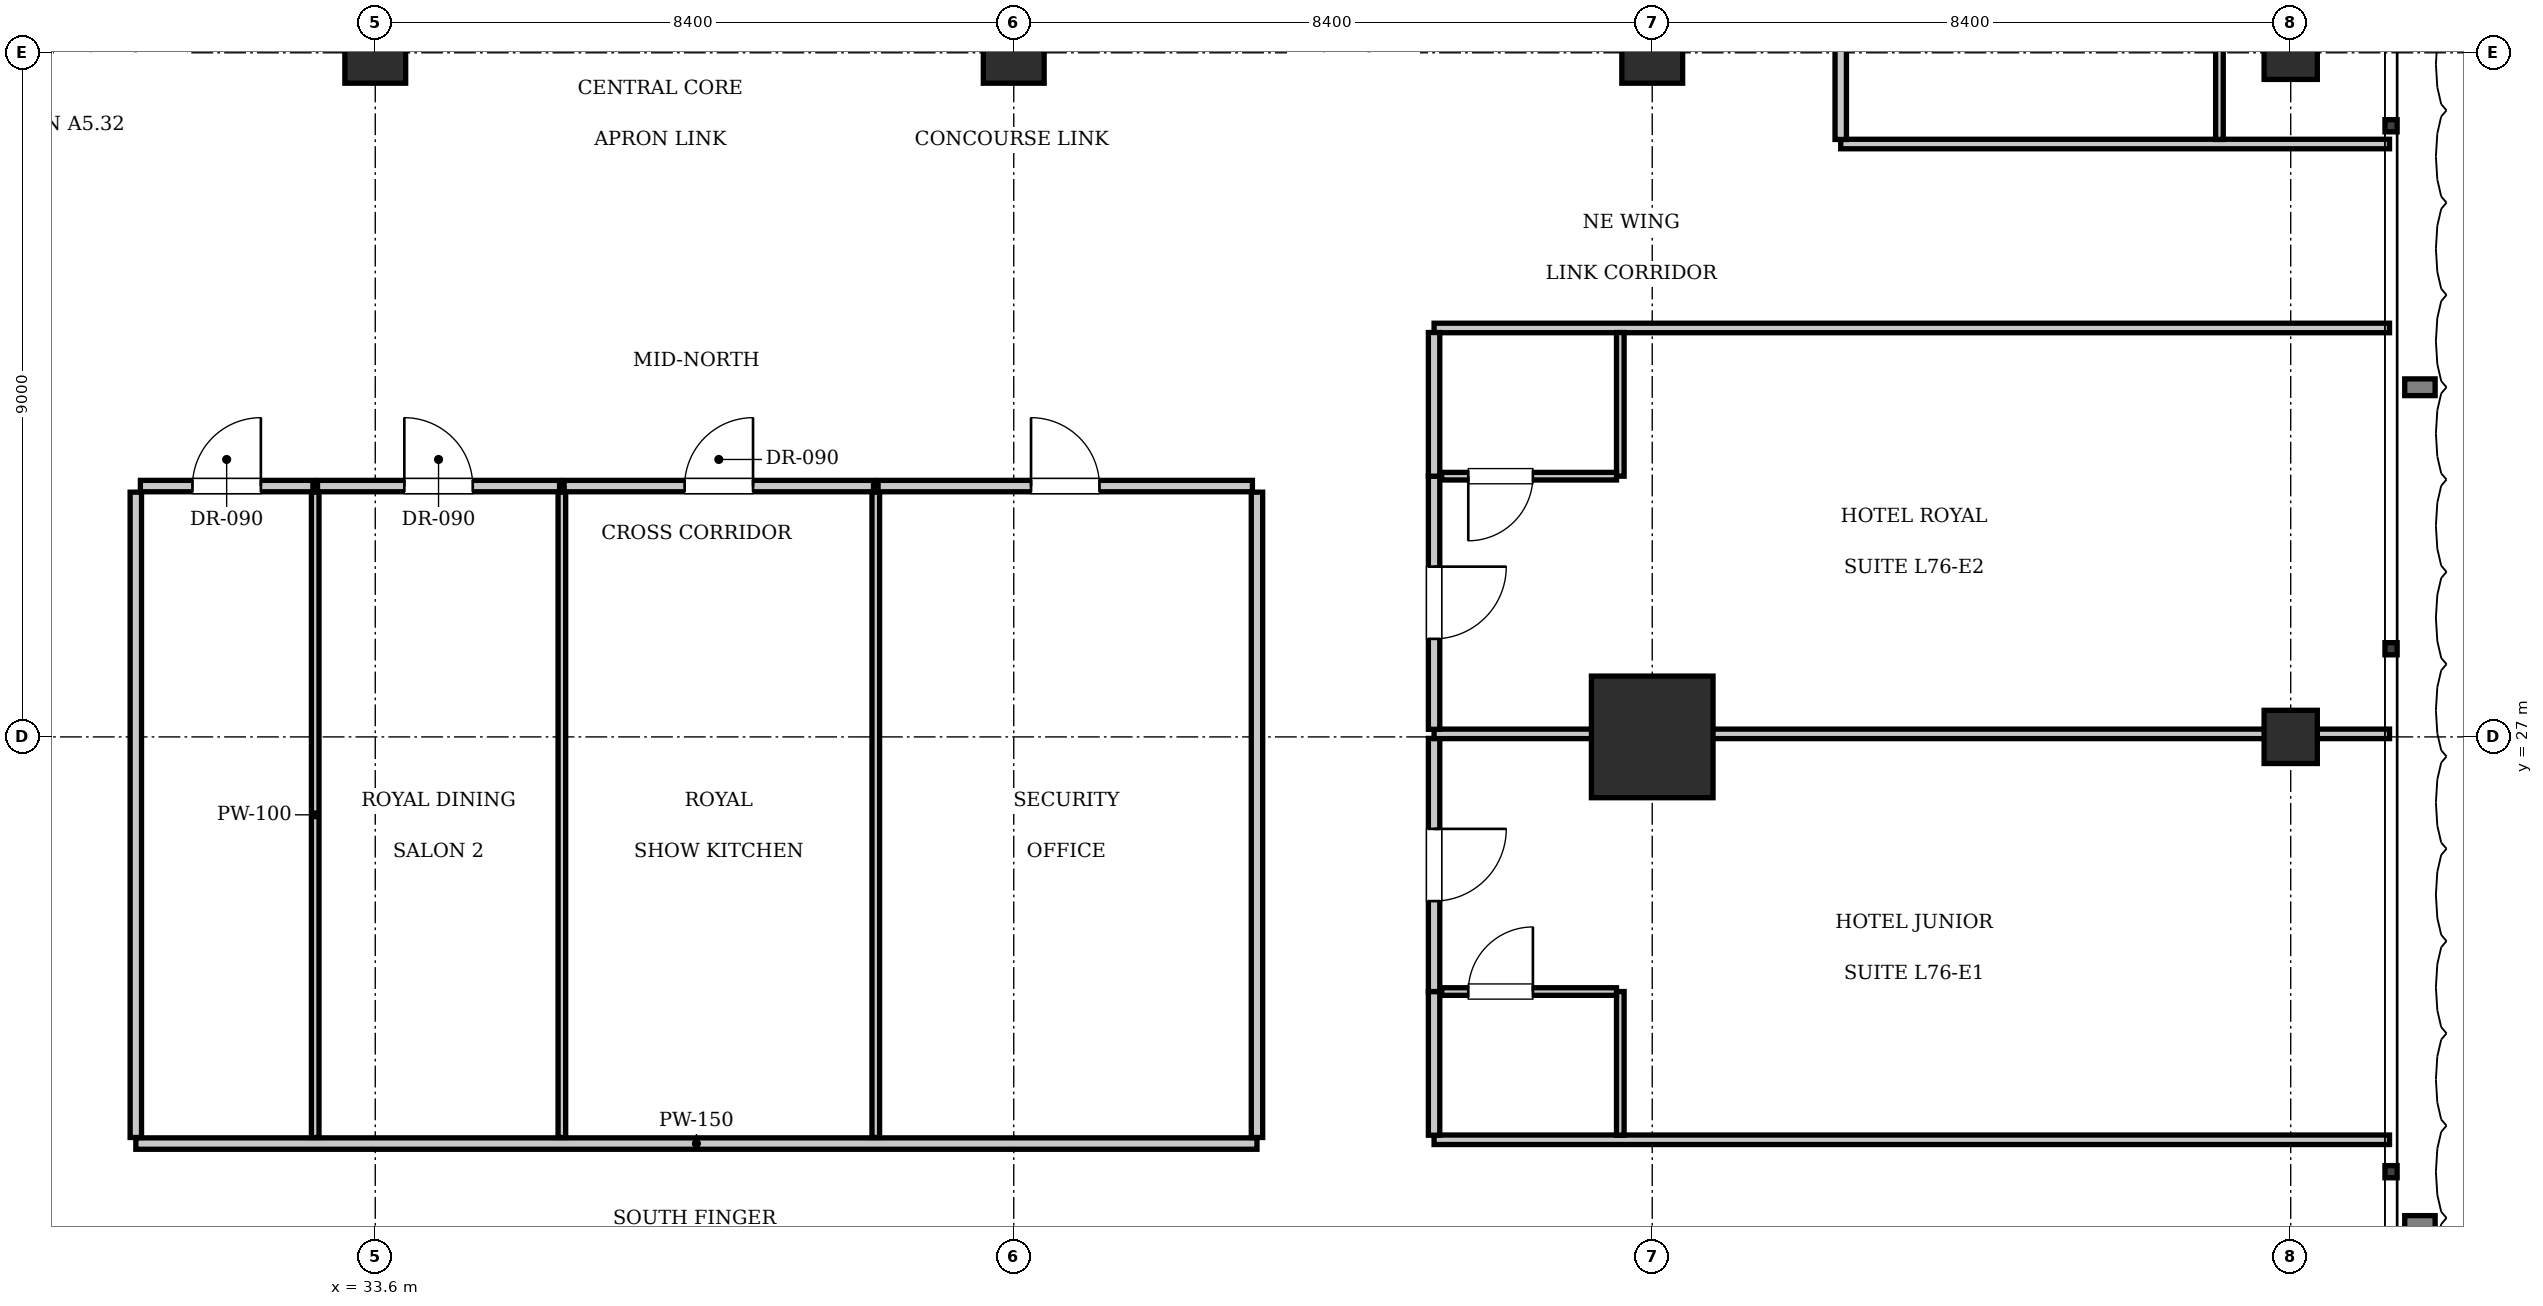
"""IFC4 building model, lengths in metres.
Left out: names, types, materials, properties, quantities, classifications, styles, units other than length and angle.
Written with IfcOpenShell. Run it as: python <this file> out.ifc"""

import sys

from ifc_helpers import new_model, si_unit, direction, frame, frame_2d, origin, origin_2d, place, context, subcontext, project, spatial, rectangle, extrude, element, fill, save


model = new_model("IFC4")
c1 = context("Model", 3, precision=1e-05, world=origin(), true_north=direction((0.0, 1.0)))
c2 = subcontext(c1, "Body", "Model", "MODEL_VIEW")
j1 = project(units=[si_unit("LENGTHUNIT", "METRE"), si_unit("PLANEANGLEUNIT", "RADIAN")], contexts=[c1])
p1 = place(None, origin())
s1 = spatial("IfcSite", under=j1, at=p1, CompositionType="ELEMENT")
p2 = place(p1, origin())
s2 = spatial("IfcBuilding", under=s1, at=p2, CompositionType="ELEMENT")
p3 = place(p2, frame((0.0, 0.0, 308.7)))
s3 = spatial("IfcBuildingStorey", under=s2, at=p3, CompositionType="ELEMENT", Elevation=308.7)
p4 = place(p3, frame((50.4, 27.0, 0.0), z_axis=(0.0, 0.0, 1.0), x_axis=(1.0, 0.0, 0.0)))
e1 = element("IfcColumn", 1, at=p4, inside=s3, PredefinedType="COLUMN", context=c2, shape_type="SweptSolid", body=[
    extrude(rectangle(XDim=1.6, YDim=1.6, at=origin_2d()), origin(), (0.0, 0.0, 1.0), 3.85),
])
for number, where, z_axis, x_axis in (
    (2, (33.6, 36.0, 0.0), (0.0, 0.0, 1.0), (1.0, 0.0, 0.0)),
    (3, (42.0, 36.0, 0.0), (0.0, 0.0, 1.0), (1.0, 0.0, 0.0)),
    (4, (50.4, 36.0, 0.0), (0.0, 0.0, 1.0), (1.0, 0.0, 0.0)),
):
    element("IfcColumn", number, at=place(p3, frame(where, z_axis=z_axis, x_axis=x_axis)), inside=s3, PredefinedType="COLUMN", context=c2, shape_type="SweptSolid", body=[
        extrude(rectangle(XDim=0.8, YDim=0.8, at=origin_2d()), origin(), (0.0, 0.0, 1.0), 3.85),
    ])
for number, where, z_axis, x_axis in (
    (5, (58.8, 27.0, 0.0), (0.0, 0.0, 1.0), (1.0, 0.0, 0.0)),
    (6, (58.8, 36.0, 0.0), (0.0, 0.0, 1.0), (1.0, 0.0, 0.0)),
):
    element("IfcColumn", number, at=place(p3, frame(where, z_axis=z_axis, x_axis=x_axis)), inside=s3, PredefinedType="COLUMN", context=c2, shape_type="SweptSolid", body=[
        extrude(rectangle(XDim=0.7, YDim=0.7, at=origin_2d()), origin(), (0.0, 0.0, 1.0), 3.85),
    ])
p5 = place(p3, frame((30.45, 21.65, 0.0), z_axis=(0.0, 0.0, 1.0), x_axis=(1.0, 0.0, 0.0)))
e7 = element("IfcWall", 7, at=p5, inside=s3, PredefinedType="PARTITIONING", context=c2, shape_type="SweptSolid", body=[
    extrude(rectangle(XDim=14.75, YDim=0.15, at=frame_2d((7.375, 0.0))), origin(), (0.0, 0.0, 1.0), 3.61),
])
for number, where, z_axis, x_axis in (
    (8, (30.45, 21.73, 0.0), (0.0, 0.0, 1.0), (0.0, 1.0, 0.0)),
    (9, (45.2, 21.73, 0.0), (0.0, 0.0, 1.0), (0.0, 1.0, 0.0)),
):
    element("IfcWall", number, at=place(p3, frame(where, z_axis=z_axis, x_axis=x_axis)), inside=s3, PredefinedType="PARTITIONING", context=c2, shape_type="SweptSolid", body=[
        extrude(rectangle(XDim=8.49, YDim=0.15, at=frame_2d((4.245, 0.0))), origin(), (0.0, 0.0, 1.0), 3.61),
    ])
p6 = place(p3, frame((30.51, 30.3, 0.0), z_axis=(0.0, 0.0, 1.0), x_axis=(1.0, 0.0, 0.0)))
e10 = element("IfcWall", 10, at=p6, inside=s3, PredefinedType="PARTITIONING", context=c2, shape_type="SweptSolid", body=[
    extrude(rectangle(XDim=2.27, YDim=0.15, at=frame_2d((1.135, 0.0))), origin(), (0.0, 0.0, 1.0), 3.61),
])
p7 = place(p6, frame((0.685, 0.0, 0.0)))
e11 = element("IfcOpeningElement", 11, at=p7, cuts=e10, PredefinedType="OPENING", context=c2, shape_type="SweptSolid", body=[
    extrude(rectangle(XDim=0.9, YDim=2.1, at=frame_2d((0.45, 1.05))), frame((0.0, 0.085, 0.0), z_axis=(0.0, -1.0, 0.0), x_axis=(1.0, 0.0, 0.0)), (0.0, 0.0, 1.0), 0.17),
])
p8 = place(p3, frame((32.81, 21.73, 0.0), z_axis=(0.0, 0.0, 1.0), x_axis=(0.0, 1.0, 0.0)))
e12 = element("IfcWall", 12, at=p8, inside=s3, PredefinedType="PARTITIONING", context=c2, shape_type="SweptSolid", body=[
    extrude(rectangle(XDim=8.49, YDim=0.1, at=frame_2d((4.245, 0.0))), origin(), (0.0, 0.0, 1.0), 3.61),
])
p9 = place(p3, frame((32.84, 30.3, 0.0), z_axis=(0.0, 0.0, 1.0), x_axis=(1.0, 0.0, 0.0)))
e13 = element("IfcWall", 13, at=p9, inside=s3, PredefinedType="PARTITIONING", context=c2, shape_type="SweptSolid", body=[
    extrude(rectangle(XDim=3.185, YDim=0.15, at=frame_2d((1.592, 0.0))), origin(), (0.0, 0.0, 1.0), 3.61),
])
p10 = place(p9, frame((1.143, 0.0, 0.0)))
e14 = element("IfcOpeningElement", 14, at=p10, cuts=e13, PredefinedType="OPENING", context=c2, shape_type="SweptSolid", body=[
    extrude(rectangle(XDim=0.9, YDim=2.1, at=frame_2d((0.45, 1.05))), frame((0.0, 0.085, 0.0), z_axis=(0.0, -1.0, 0.0), x_axis=(1.0, 0.0, 0.0)), (0.0, 0.0, 1.0), 0.17),
])
p11 = place(p3, frame((36.055, 21.73, 0.0), z_axis=(0.0, 0.0, 1.0), x_axis=(0.0, 1.0, 0.0)))
e15 = element("IfcWall", 15, at=p11, inside=s3, PredefinedType="PARTITIONING", context=c2, shape_type="SweptSolid", body=[
    extrude(rectangle(XDim=8.49, YDim=0.1, at=frame_2d((4.245, 0.0))), origin(), (0.0, 0.0, 1.0), 3.61),
])
p12 = place(p3, frame((36.085, 30.3, 0.0), z_axis=(0.0, 0.0, 1.0), x_axis=(1.0, 0.0, 0.0)))
e16 = element("IfcWall", 16, at=p12, inside=s3, PredefinedType="PARTITIONING", context=c2, shape_type="SweptSolid", body=[
    extrude(rectangle(XDim=4.07, YDim=0.15, at=frame_2d((2.035, 0.0))), origin(), (0.0, 0.0, 1.0), 3.61),
])
p13 = place(p12, frame((1.585, 0.0, 0.0)))
e17 = element("IfcOpeningElement", 17, at=p13, cuts=e16, PredefinedType="OPENING", context=c2, shape_type="SweptSolid", body=[
    extrude(rectangle(XDim=0.9, YDim=2.1, at=frame_2d((0.45, 1.05))), frame((0.0, 0.085, 0.0), z_axis=(0.0, -1.0, 0.0), x_axis=(1.0, 0.0, 0.0)), (0.0, 0.0, 1.0), 0.17),
])
p14 = place(p3, frame((40.185, 21.73, 0.0), z_axis=(0.0, 0.0, 1.0), x_axis=(0.0, 1.0, 0.0)))
e18 = element("IfcWall", 18, at=p14, inside=s3, PredefinedType="PARTITIONING", context=c2, shape_type="SweptSolid", body=[
    extrude(rectangle(XDim=8.49, YDim=0.1, at=frame_2d((4.245, 0.0))), origin(), (0.0, 0.0, 1.0), 3.61),
])
p15 = place(p3, frame((40.215, 30.3, 0.0), z_axis=(0.0, 0.0, 1.0), x_axis=(1.0, 0.0, 0.0)))
e19 = element("IfcWall", 19, at=p15, inside=s3, PredefinedType="PARTITIONING", context=c2, shape_type="SweptSolid", body=[
    extrude(rectangle(XDim=4.925, YDim=0.15, at=frame_2d((2.462, 0.0))), origin(), (0.0, 0.0, 1.0), 3.61),
])
p16 = place(p15, frame((2.012, 0.0, 0.0)))
e20 = element("IfcOpeningElement", 20, at=p16, cuts=e19, PredefinedType="OPENING", context=c2, shape_type="SweptSolid", body=[
    extrude(rectangle(XDim=0.9, YDim=2.1, at=frame_2d((0.45, 1.05))), frame((0.0, 0.085, 0.0), z_axis=(0.0, -1.0, 0.0), x_axis=(1.0, 0.0, 0.0)), (0.0, 0.0, 1.0), 0.17),
])
for number, where, z_axis, x_axis in (
    (21, (47.53, 21.7, 0.0), (0.0, 0.0, 1.0), (1.0, 0.0, 0.0)),
    (22, (47.53, 32.38, 0.0), (0.0, 0.0, 1.0), (1.0, 0.0, 0.0)),
):
    element("IfcWall", number, at=place(p3, frame(where, z_axis=z_axis, x_axis=x_axis)), inside=s3, PredefinedType="PARTITIONING", context=c2, shape_type="SweptSolid", body=[
        extrude(rectangle(XDim=12.57, YDim=0.125, at=frame_2d((6.285, 0.0))), origin(), (0.0, 0.0, 1.0), 3.61),
    ])
p17 = place(p3, frame((47.53, 21.76, 0.0), z_axis=(0.0, 0.0, 1.0), x_axis=(0.0, 1.0, 0.0)))
e23 = element("IfcWall", 23, at=p17, inside=s3, PredefinedType="PARTITIONING", context=c2, shape_type="SweptSolid", body=[
    extrude(rectangle(XDim=1.89, YDim=0.15, at=frame_2d((0.945, 0.0))), origin(), (0.0, 0.0, 1.0), 3.61),
])
p18 = place(p3, frame((47.53, 23.65, 0.0), z_axis=(0.0, 0.0, 1.0), x_axis=(0.0, 1.0, 0.0)))
e24 = element("IfcWall", 24, at=p18, inside=s3, PredefinedType="PARTITIONING", context=c2, shape_type="SweptSolid", body=[
    extrude(rectangle(XDim=3.33, YDim=0.15, at=frame_2d((1.665, 0.0))), origin(), (0.0, 0.0, 1.0), 3.61),
])
p19 = place(p18, frame((1.19, 0.0, 0.0)))
e25 = element("IfcOpeningElement", 25, at=p19, cuts=e24, PredefinedType="OPENING", context=c2, shape_type="SweptSolid", body=[
    extrude(rectangle(XDim=0.95, YDim=2.15, at=frame_2d((0.475, 1.075))), frame((0.0, 0.085, 0.0), z_axis=(0.0, -1.0, 0.0), x_axis=(1.0, 0.0, 0.0)), (0.0, 0.0, 1.0), 0.17),
])
p20 = place(p3, frame((49.98, 21.76, 0.0), z_axis=(0.0, 0.0, 1.0), x_axis=(0.0, 1.0, 0.0)))
e26 = element("IfcWall", 26, at=p20, inside=s3, PredefinedType="PARTITIONING", context=c2, shape_type="SweptSolid", body=[
    extrude(rectangle(XDim=1.89, YDim=0.1, at=frame_2d((0.945, 0.0))), origin(), (0.0, 0.0, 1.0), 3.61),
])
p21 = place(p3, frame((47.63, 23.65, 0.0), z_axis=(0.0, 0.0, 1.0), x_axis=(1.0, 0.0, 0.0)))
e27 = element("IfcWall", 27, at=p21, inside=s3, PredefinedType="PARTITIONING", context=c2, shape_type="SweptSolid", body=[
    extrude(rectangle(XDim=2.3, YDim=0.1, at=frame_2d((1.15, 0.0))), origin(), (0.0, 0.0, 1.0), 3.61),
])
p22 = place(p21, frame((0.35, 0.0, 0.0)))
e28 = element("IfcOpeningElement", 28, at=p22, cuts=e27, PredefinedType="OPENING", context=c2, shape_type="SweptSolid", body=[
    extrude(rectangle(XDim=0.85, YDim=2.1, at=frame_2d((0.425, 1.05))), frame((0.0, 0.06, 0.0), z_axis=(0.0, -1.0, 0.0), x_axis=(1.0, 0.0, 0.0)), (0.0, 0.0, 1.0), 0.12),
])
p23 = place(p3, frame((47.53, 27.04, 0.0), z_axis=(0.0, 0.0, 1.0), x_axis=(1.0, 0.0, 0.0)))
e29 = element("IfcWall", 29, at=p23, inside=s3, PredefinedType="PARTITIONING", context=c2, shape_type="SweptSolid", body=[
    extrude(rectangle(XDim=12.57, YDim=0.125, at=frame_2d((6.285, 0.0))), origin(), (0.0, 0.0, 1.0), 2.41),
])
p24 = place(p3, frame((47.53, 27.1, 0.0), z_axis=(0.0, 0.0, 1.0), x_axis=(0.0, 1.0, 0.0)))
e30 = element("IfcWall", 30, at=p24, inside=s3, PredefinedType="PARTITIONING", context=c2, shape_type="SweptSolid", body=[
    extrude(rectangle(XDim=3.33, YDim=0.15, at=frame_2d((1.665, 0.0))), origin(), (0.0, 0.0, 1.0), 3.61),
])
p25 = place(p24, frame((1.19, 0.0, 0.0)))
e31 = element("IfcOpeningElement", 31, at=p25, cuts=e30, PredefinedType="OPENING", context=c2, shape_type="SweptSolid", body=[
    extrude(rectangle(XDim=0.95, YDim=2.15, at=frame_2d((0.475, 1.075))), frame((0.0, 0.085, 0.0), z_axis=(0.0, -1.0, 0.0), x_axis=(1.0, 0.0, 0.0)), (0.0, 0.0, 1.0), 0.17),
])
p26 = place(p3, frame((47.53, 30.43, 0.0), z_axis=(0.0, 0.0, 1.0), x_axis=(0.0, 1.0, 0.0)))
e32 = element("IfcWall", 32, at=p26, inside=s3, PredefinedType="PARTITIONING", context=c2, shape_type="SweptSolid", body=[
    extrude(rectangle(XDim=1.89, YDim=0.15, at=frame_2d((0.945, 0.0))), origin(), (0.0, 0.0, 1.0), 3.61),
])
p27 = place(p3, frame((49.98, 30.43, 0.0), z_axis=(0.0, 0.0, 1.0), x_axis=(0.0, 1.0, 0.0)))
e33 = element("IfcWall", 33, at=p27, inside=s3, PredefinedType="PARTITIONING", context=c2, shape_type="SweptSolid", body=[
    extrude(rectangle(XDim=1.89, YDim=0.1, at=frame_2d((0.945, 0.0))), origin(), (0.0, 0.0, 1.0), 3.61),
])
p28 = place(p3, frame((47.63, 30.43, 0.0), z_axis=(0.0, 0.0, 1.0), x_axis=(1.0, 0.0, 0.0)))
e34 = element("IfcWall", 34, at=p28, inside=s3, PredefinedType="PARTITIONING", context=c2, shape_type="SweptSolid", body=[
    extrude(rectangle(XDim=2.3, YDim=0.1, at=frame_2d((1.15, 0.0))), origin(), (0.0, 0.0, 1.0), 3.61),
])
p29 = place(p28, frame((0.35, 0.0, 0.0)))
e35 = element("IfcOpeningElement", 35, at=p29, cuts=e34, PredefinedType="OPENING", context=c2, shape_type="SweptSolid", body=[
    extrude(rectangle(XDim=0.85, YDim=2.1, at=frame_2d((0.425, 1.05))), frame((0.0, 0.06, 0.0), z_axis=(0.0, -1.0, 0.0), x_axis=(1.0, 0.0, 0.0)), (0.0, 0.0, 1.0), 0.12),
])
p30 = place(p3, frame((52.88, 34.8, 0.0), z_axis=(0.0, 0.0, 1.0), x_axis=(1.0, 0.0, 0.0)))
e36 = element("IfcWall", 36, at=p30, inside=s3, PredefinedType="PARTITIONING", context=c2, shape_type="SweptSolid", body=[
    extrude(rectangle(XDim=7.22, YDim=0.125, at=frame_2d((3.61, 0.0))), origin(), (0.0, 0.0, 1.0), 3.61),
])
p31 = place(p3, frame((52.88, 34.86, 0.0), z_axis=(0.0, 0.0, 1.0), x_axis=(0.0, 1.0, 0.0)))
e37 = element("IfcWall", 37, at=p31, inside=s3, PredefinedType="PARTITIONING", context=c2, shape_type="SweptSolid", body=[
    extrude(rectangle(XDim=11.527, YDim=0.15, at=frame_2d((5.764, 0.0))), origin(), (0.0, 0.0, 1.0), 3.61),
])
p32 = place(p31, frame((5.289, 0.0, 0.0)))
e38 = element("IfcOpeningElement", 38, at=p32, cuts=e37, PredefinedType="OPENING", context=c2, shape_type="SweptSolid", body=[
    extrude(rectangle(XDim=0.95, YDim=2.15, at=frame_2d((0.475, 1.075))), frame((0.0, 0.085, 0.0), z_axis=(0.0, -1.0, 0.0), x_axis=(1.0, 0.0, 0.0)), (0.0, 0.0, 1.0), 0.17),
])
p33 = place(p3, frame((57.862, 34.86, 0.0), z_axis=(0.0, 0.0, 1.0), x_axis=(0.0, 1.0, 0.0)))
e39 = element("IfcWall", 39, at=p33, inside=s3, PredefinedType="PARTITIONING", context=c2, shape_type="SweptSolid", body=[
    extrude(rectangle(XDim=13.938, YDim=0.1, at=frame_2d((6.969, 0.0))), origin(), (0.0, 0.0, 1.0), 3.61),
])
p34 = place(p33, frame((6.519, 0.0, 0.0)))
e40 = element("IfcOpeningElement", 40, at=p34, cuts=e39, PredefinedType="OPENING", context=c2, shape_type="SweptSolid", body=[
    extrude(rectangle(XDim=0.9, YDim=2.1, at=frame_2d((0.45, 1.05))), frame((0.0, 0.06, 0.0), z_axis=(0.0, -1.0, 0.0), x_axis=(1.0, 0.0, 0.0)), (0.0, 0.0, 1.0), 0.12),
])
p35 = place(p7, origin())
e41 = element("IfcDoor", 41, at=p35, inside=s3, OperationType="SINGLE_SWING_RIGHT", PredefinedType="DOOR", context=c2, shape_type="SweptSolid", body=[
    extrude(rectangle(XDim=0.9, YDim=2.1, at=frame_2d((0.45, 1.05))), frame((0.0, 0.025, 0.0), z_axis=(0.0, -1.0, 0.0), x_axis=(1.0, 0.0, 0.0)), (0.0, 0.0, 1.0), 0.05),
])
fill(e11, e41)
p36 = place(p10, origin())
e42 = element("IfcDoor", 42, at=p36, inside=s3, OperationType="SINGLE_SWING_LEFT", PredefinedType="DOOR", context=c2, shape_type="SweptSolid", body=[
    extrude(rectangle(XDim=0.9, YDim=2.1, at=frame_2d((0.45, 1.05))), frame((0.0, 0.025, 0.0), z_axis=(0.0, -1.0, 0.0), x_axis=(1.0, 0.0, 0.0)), (0.0, 0.0, 1.0), 0.05),
])
fill(e14, e42)
p37 = place(p13, origin())
e43 = element("IfcDoor", 43, at=p37, inside=s3, OperationType="SINGLE_SWING_RIGHT", PredefinedType="DOOR", context=c2, shape_type="SweptSolid", body=[
    extrude(rectangle(XDim=0.9, YDim=2.1, at=frame_2d((0.45, 1.05))), frame((0.0, 0.025, 0.0), z_axis=(0.0, -1.0, 0.0), x_axis=(1.0, 0.0, 0.0)), (0.0, 0.0, 1.0), 0.05),
])
fill(e17, e43)
p38 = place(p16, origin())
e44 = element("IfcDoor", 44, at=p38, inside=s3, OperationType="SINGLE_SWING_LEFT", PredefinedType="DOOR", context=c2, shape_type="SweptSolid", body=[
    extrude(rectangle(XDim=0.9, YDim=2.1, at=frame_2d((0.45, 1.05))), frame((0.0, 0.025, 0.0), z_axis=(0.0, -1.0, 0.0), x_axis=(1.0, 0.0, 0.0)), (0.0, 0.0, 1.0), 0.05),
])
fill(e20, e44)
p39 = place(p22, origin())
e45 = element("IfcDoor", 45, at=p39, inside=s3, OperationType="SINGLE_SWING_RIGHT", PredefinedType="DOOR", context=c2, shape_type="SweptSolid", body=[
    extrude(rectangle(XDim=0.85, YDim=2.1, at=frame_2d((0.425, 1.05))), frame((0.0, 0.025, 0.0), z_axis=(0.0, -1.0, 0.0), x_axis=(1.0, 0.0, 0.0)), (0.0, 0.0, 1.0), 0.05),
])
fill(e28, e45)
p40 = place(p19, frame((0.95, 0.0, 0.0), z_axis=(0.0, 0.0, 1.0), x_axis=(-1.0, 0.0, 0.0)))
e46 = element("IfcDoor", 46, at=p40, inside=s3, OperationType="SINGLE_SWING_LEFT", PredefinedType="DOOR", context=c2, shape_type="SweptSolid", body=[
    extrude(rectangle(XDim=0.95, YDim=2.15, at=frame_2d((0.475, 1.075))), frame((0.0, 0.025, 0.0), z_axis=(0.0, -1.0, 0.0), x_axis=(1.0, 0.0, 0.0)), (0.0, 0.0, 1.0), 0.05),
])
fill(e25, e46)
p41 = place(p29, frame((0.85, 0.0, 0.0), z_axis=(0.0, 0.0, 1.0), x_axis=(-1.0, 0.0, 0.0)))
e47 = element("IfcDoor", 47, at=p41, inside=s3, OperationType="SINGLE_SWING_RIGHT", PredefinedType="DOOR", context=c2, shape_type="SweptSolid", body=[
    extrude(rectangle(XDim=0.85, YDim=2.1, at=frame_2d((0.425, 1.05))), frame((0.0, 0.025, 0.0), z_axis=(0.0, -1.0, 0.0), x_axis=(1.0, 0.0, 0.0)), (0.0, 0.0, 1.0), 0.05),
])
fill(e35, e47)
p42 = place(p25, frame((0.95, 0.0, 0.0), z_axis=(0.0, 0.0, 1.0), x_axis=(-1.0, 0.0, 0.0)))
e48 = element("IfcDoor", 48, at=p42, inside=s3, OperationType="SINGLE_SWING_LEFT", PredefinedType="DOOR", context=c2, shape_type="SweptSolid", body=[
    extrude(rectangle(XDim=0.95, YDim=2.15, at=frame_2d((0.475, 1.075))), frame((0.0, 0.025, 0.0), z_axis=(0.0, -1.0, 0.0), x_axis=(1.0, 0.0, 0.0)), (0.0, 0.0, 1.0), 0.05),
])
fill(e31, e48)
save(model, sys.argv[1])
